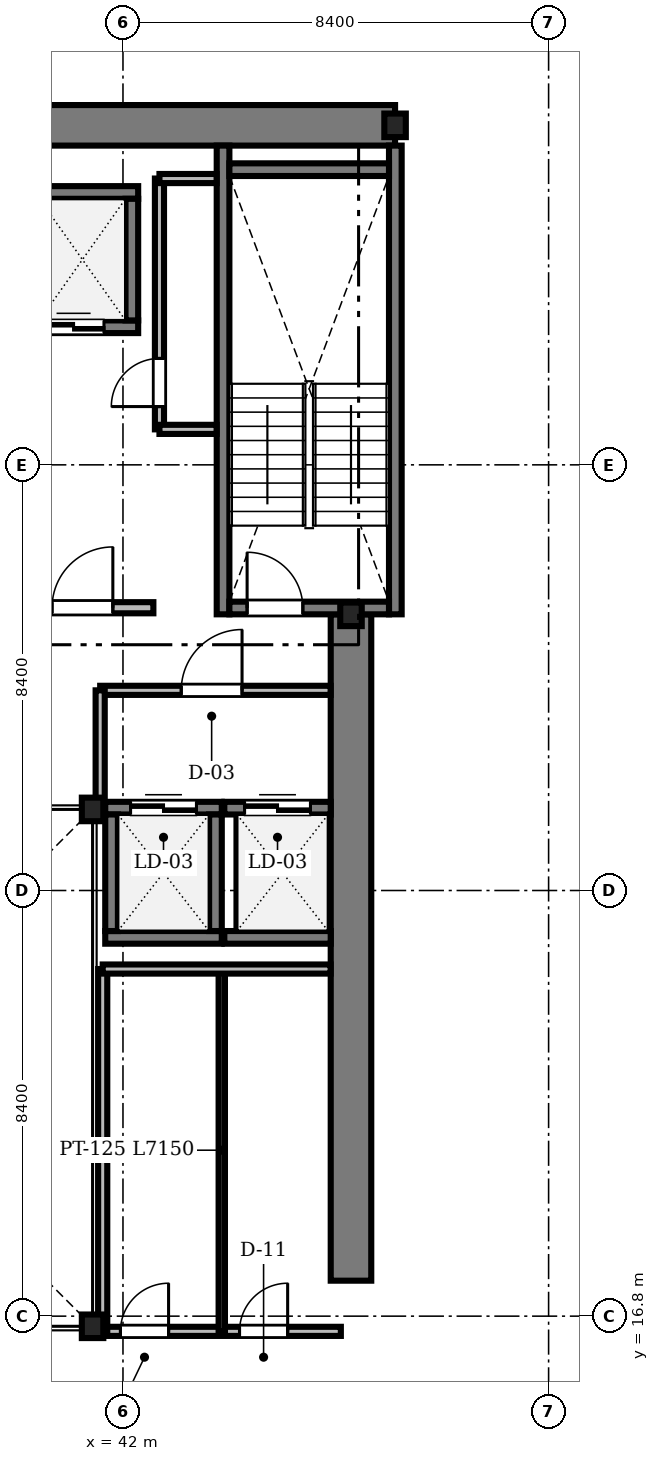
"""IFC4 building model, lengths in metres.
Left out: names, types, materials, properties, quantities, classifications, styles, units other than length and angle.
Written with IfcOpenShell. Run it as: python <this file> out.ifc"""

import sys

from ifc_helpers import new_model, si_unit, direction, frame, frame_2d, origin, origin_2d, place, context, subcontext, project, spatial, rectangle, i_section, extrude, source, transform, mapped, element, fill, save


model = new_model("IFC4")
c1 = context("Model", 3, precision=1e-05, world=origin(), true_north=direction((0.0, 1.0)))
c2 = subcontext(c1, "Body", "Model", "MODEL_VIEW")
j1 = project(units=[si_unit("LENGTHUNIT", "METRE"), si_unit("PLANEANGLEUNIT", "RADIAN")], contexts=[c1])
p1 = place(None, origin())
s1 = spatial("IfcSite", under=j1, at=p1, CompositionType="ELEMENT")
p2 = place(p1, origin())
s2 = spatial("IfcBuilding", under=s1, at=p2, CompositionType="ELEMENT")
p3 = place(p2, frame((0.0, 0.0, 155.7)))
s3 = spatial("IfcBuildingStorey", under=s2, at=p3, CompositionType="ELEMENT", Elevation=155.7)
m1 = source(origin(), c2, "Body", "SweptSolid", [
    extrude(rectangle(XDim=17.52, YDim=0.8, at=frame_2d((8.76, 0.0))), origin(), (0.0, 0.0, 1.0), 3.46),
])
p4 = place(p3, frame((29.85, 40.3, 0.0), z_axis=(0.0, 0.0, 1.0), x_axis=(1.0, 0.0, 0.0)))
e1 = element("IfcWall", 1, at=p4, inside=s3, PredefinedType="SHEAR", context=c2, shape_type="MappedRepresentation", body=[
    mapped(m1, transform((0.0, 0.0, 0.0), scale=1.0)),
])
m2 = source(origin(), c2, "Body", "SweptSolid", [
    extrude(rectangle(XDim=13.15, YDim=0.8, at=frame_2d((6.575, 0.0))), origin(), (0.0, 0.0, 1.0), 3.46),
])
p5 = place(p3, frame((46.5, 17.5, 0.0), z_axis=(0.0, 0.0, 1.0), x_axis=(0.0, 1.0, 0.0)))
e2 = element("IfcWall", 2, at=p5, inside=s3, PredefinedType="SHEAR", context=c2, shape_type="MappedRepresentation", body=[
    mapped(m2, transform((0.0, 0.0, 0.0), scale=1.0)),
])
m3 = source(origin(), c2, "Body", "SweptSolid", [
    extrude(i_section(OverallWidth=0.424, OverallDepth=0.465, WebThickness=0.035, FlangeThickness=0.056, FilletRadius=0.015, at=origin_2d()), origin(), (0.0, 0.0, 1.0), 3.46),
])
for number, where, z_axis, x_axis in (
    (3, (41.4, 16.6, 0.0), (0.0, 0.0, 1.0), (1.0, 0.0, 0.0)),
    (4, (41.4, 26.8, 0.0), (0.0, 0.0, 1.0), (1.0, 0.0, 0.0)),
    (5, (46.5, 30.65, 0.0), (0.0, 0.0, 1.0), (1.0, 0.0, 0.0)),
    (6, (47.37, 40.3, 0.0), (0.0, 0.0, 1.0), (1.0, 0.0, 0.0)),
):
    element("IfcColumn", number, at=place(p3, frame(where, z_axis=z_axis, x_axis=x_axis)), inside=s3, PredefinedType="COLUMN", context=c2, shape_type="MappedRepresentation", body=[
        mapped(m3, transform((0.0, 0.0, 0.0), scale=1.0)),
    ])
m4 = source(origin(), c2, "Body", "SweptSolid", [
    extrude(rectangle(XDim=9.25, YDim=0.25, at=frame_2d((4.625, 0.0))), origin(), (0.0, 0.0, 1.0), 3.5),
])
for number, where, z_axis, x_axis in (
    (7, (43.975, 30.65, 0.0), (0.0, 0.0, 1.0), (0.0, 1.0, 0.0)),
    (8, (47.375, 30.65, 0.0), (0.0, 0.0, 1.0), (0.0, 1.0, 0.0)),
):
    element("IfcWall", number, at=place(p3, frame(where, z_axis=z_axis, x_axis=x_axis)), inside=s3, PredefinedType="SOLIDWALL", context=c2, shape_type="MappedRepresentation", body=[
        mapped(m4, transform((0.0, 0.0, 0.0), scale=1.0)),
    ])
m5 = source(origin(), c2, "Body", "SweptSolid", [
    extrude(rectangle(XDim=3.15, YDim=0.25, at=frame_2d((1.575, 0.0))), origin(), (0.0, 0.0, 1.0), 3.5),
])
p6 = place(p3, frame((44.1, 39.425, 0.0), z_axis=(0.0, 0.0, 1.0), x_axis=(1.0, 0.0, 0.0)))
e9 = element("IfcWall", 9, at=p6, inside=s3, PredefinedType="SOLIDWALL", context=c2, shape_type="MappedRepresentation", body=[
    mapped(m5, transform((0.0, 0.0, 0.0), scale=1.0)),
])
p7 = place(p3, frame((44.1, 30.775, 0.0), z_axis=(0.0, 0.0, 1.0), x_axis=(1.0, 0.0, 0.0)))
e10 = element("IfcWall", 10, at=p7, inside=s3, PredefinedType="SOLIDWALL", context=c2, shape_type="MappedRepresentation", body=[
    mapped(m5, transform((0.0, 0.0, 0.0), scale=1.0)),
])
m6 = source(origin(), c2, "Body", "SweptSolid", [
    extrude(rectangle(XDim=1.1, YDim=2.2, at=frame_2d((0.55, 1.1))), frame((0.0, 0.135, 0.0), z_axis=(0.0, -1.0, 0.0), x_axis=(1.0, 0.0, 0.0)), (0.0, 0.0, 1.0), 0.27),
])
p8 = place(p7, frame((0.35, 0.0, 0.0)))
e11 = element("IfcOpeningElement", 11, at=p8, cuts=e10, PredefinedType="OPENING", context=c2, shape_type="MappedRepresentation", body=[
    mapped(m6, transform((0.0, 0.0, 0.0), scale=1.0)),
])
m7 = source(origin(), c2, "Body", "SweptSolid", [
    extrude(rectangle(XDim=2.8, YDim=0.22, at=frame_2d((1.4, 0.0))), origin(), (0.0, 0.0, 1.0), 3.46),
])
p9 = place(p3, frame((39.8, 30.78, 0.0), z_axis=(0.0, 0.0, 1.0), x_axis=(1.0, 0.0, 0.0)))
e12 = element("IfcWall", 12, at=p9, inside=s3, PredefinedType="SOLIDWALL", context=c2, shape_type="MappedRepresentation", body=[
    mapped(m7, transform((0.0, 0.0, 0.0), scale=1.0)),
])
m8 = source(origin(), c2, "Body", "SweptSolid", [
    extrude(rectangle(XDim=1.2, YDim=2.2, at=frame_2d((0.6, 1.1))), frame((0.0, 0.12, 0.0), z_axis=(0.0, -1.0, 0.0), x_axis=(1.0, 0.0, 0.0)), (0.0, 0.0, 1.0), 0.24),
])
p10 = place(p9, frame((0.8, 0.0, 0.0)))
e13 = element("IfcOpeningElement", 13, at=p10, cuts=e12, PredefinedType="OPENING", context=c2, shape_type="MappedRepresentation", body=[
    mapped(m8, transform((0.0, 0.0, 0.0), scale=1.0)),
])
m9 = source(origin(), c2, "Body", "SweptSolid", [
    extrude(rectangle(XDim=2.55, YDim=0.25, at=frame_2d((1.275, 0.0))), origin(), (0.0, 0.0, 1.0), 3.46),
])
p11 = place(p3, frame((39.75, 36.325, 0.0), z_axis=(0.0, 0.0, 1.0), x_axis=(1.0, 0.0, 0.0)))
e14 = element("IfcWall", 14, at=p11, inside=s3, PredefinedType="SOLIDWALL", context=c2, shape_type="MappedRepresentation", body=[
    mapped(m9, transform((0.0, 0.0, 0.0), scale=1.0)),
])
m10 = source(origin(), c2, "Body", "SweptSolid", [
    extrude(rectangle(XDim=1.2, YDim=2.25, at=frame_2d((0.6, 1.125))), frame((0.0, 0.135, 0.0), z_axis=(0.0, -1.0, 0.0), x_axis=(1.0, 0.0, 0.0)), (0.0, 0.0, 1.0), 0.27),
])
p12 = place(p11, frame((0.675, 0.0, 0.0)))
e15 = element("IfcOpeningElement", 15, at=p12, cuts=e14, PredefinedType="OPENING", context=c2, shape_type="MappedRepresentation", body=[
    mapped(m10, transform((0.0, 0.0, 0.0), scale=1.0)),
])
p13 = place(p3, frame((39.75, 38.975, 0.0), z_axis=(0.0, 0.0, 1.0), x_axis=(1.0, 0.0, 0.0)))
e16 = element("IfcWall", 16, at=p13, inside=s3, PredefinedType="SOLIDWALL", context=c2, shape_type="MappedRepresentation", body=[
    mapped(m9, transform((0.0, 0.0, 0.0), scale=1.0)),
])
m11 = source(origin(), c2, "Body", "SweptSolid", [
    extrude(rectangle(XDim=2.4, YDim=0.25, at=frame_2d((1.2, 0.0))), origin(), (0.0, 0.0, 1.0), 3.46),
])
p14 = place(p3, frame((42.175, 36.45, 0.0), z_axis=(0.0, 0.0, 1.0), x_axis=(0.0, 1.0, 0.0)))
e17 = element("IfcWall", 17, at=p14, inside=s3, PredefinedType="SOLIDWALL", context=c2, shape_type="MappedRepresentation", body=[
    mapped(m11, transform((0.0, 0.0, 0.0), scale=1.0)),
])
m12 = source(origin(), c2, "Body", "SweptSolid", [
    extrude(rectangle(XDim=2.3, YDim=0.25, at=frame_2d((1.15, 0.0))), origin(), (0.0, 0.0, 1.0), 3.46),
])
p15 = place(p3, frame((41.65, 24.275, 0.0), z_axis=(0.0, 0.0, 1.0), x_axis=(1.0, 0.0, 0.0)))
e18 = element("IfcWall", 18, at=p15, inside=s3, PredefinedType="SOLIDWALL", context=c2, shape_type="MappedRepresentation", body=[
    mapped(m12, transform((0.0, 0.0, 0.0), scale=1.0)),
])
p16 = place(p3, frame((41.65, 26.825, 0.0), z_axis=(0.0, 0.0, 1.0), x_axis=(1.0, 0.0, 0.0)))
e19 = element("IfcWall", 19, at=p16, inside=s3, PredefinedType="SOLIDWALL", context=c2, shape_type="MappedRepresentation", body=[
    mapped(m12, transform((0.0, 0.0, 0.0), scale=1.0)),
])
m13 = source(origin(), c2, "Body", "SweptSolid", [
    extrude(rectangle(XDim=1.3, YDim=2.3, at=frame_2d((0.65, 1.15))), frame((0.0, 0.135, 0.0), z_axis=(0.0, -1.0, 0.0), x_axis=(1.0, 0.0, 0.0)), (0.0, 0.0, 1.0), 0.27),
])
p17 = place(p16, frame((0.5, 0.0, 0.0)))
e20 = element("IfcOpeningElement", 20, at=p17, cuts=e19, PredefinedType="OPENING", context=c2, shape_type="MappedRepresentation", body=[
    mapped(m13, transform((0.0, 0.0, 0.0), scale=1.0)),
])
for number, where, z_axis, x_axis in (
    (21, (41.775, 24.4, 0.0), (0.0, 0.0, 1.0), (0.0, 1.0, 0.0)),
    (22, (43.825, 24.4, 0.0), (0.0, 0.0, 1.0), (0.0, 1.0, 0.0)),
):
    element("IfcWall", number, at=place(p3, frame(where, z_axis=z_axis, x_axis=x_axis)), inside=s3, PredefinedType="SOLIDWALL", context=c2, shape_type="MappedRepresentation", body=[
        mapped(m12, transform((0.0, 0.0, 0.0), scale=1.0)),
    ])
m14 = source(origin(), c2, "Body", "SweptSolid", [
    extrude(rectangle(XDim=2.1, YDim=0.25, at=frame_2d((1.05, 0.0))), origin(), (0.0, 0.0, 1.0), 3.46),
])
p18 = place(p3, frame((44.0, 24.275, 0.0), z_axis=(0.0, 0.0, 1.0), x_axis=(1.0, 0.0, 0.0)))
e23 = element("IfcWall", 23, at=p18, inside=s3, PredefinedType="SOLIDWALL", context=c2, shape_type="MappedRepresentation", body=[
    mapped(m14, transform((0.0, 0.0, 0.0), scale=1.0)),
])
p19 = place(p3, frame((44.0, 26.825, 0.0), z_axis=(0.0, 0.0, 1.0), x_axis=(1.0, 0.0, 0.0)))
e24 = element("IfcWall", 24, at=p19, inside=s3, PredefinedType="SOLIDWALL", context=c2, shape_type="MappedRepresentation", body=[
    mapped(m14, transform((0.0, 0.0, 0.0), scale=1.0)),
])
p20 = place(p19, frame((0.4, 0.0, 0.0)))
e25 = element("IfcOpeningElement", 25, at=p20, cuts=e24, PredefinedType="OPENING", context=c2, shape_type="MappedRepresentation", body=[
    mapped(m13, transform((0.0, 0.0, 0.0), scale=1.0)),
])
m15 = source(origin(), c2, "Body", "SweptSolid", [
    extrude(rectangle(XDim=4.95, YDim=0.18, at=frame_2d((2.475, 0.0))), origin(), (0.0, 0.0, 1.0), 3.46),
])
p21 = place(p3, frame((42.72, 34.3, 0.0), z_axis=(0.0, 0.0, 1.0), x_axis=(0.0, 1.0, 0.0)))
e26 = element("IfcWall", 26, at=p21, inside=s3, PredefinedType="PARTITIONING", context=c2, shape_type="MappedRepresentation", body=[
    mapped(m15, transform((0.0, 0.0, 0.0), scale=1.0)),
])
m16 = source(origin(), c2, "Body", "SweptSolid", [
    extrude(rectangle(XDim=0.95, YDim=2.15, at=frame_2d((0.475, 1.075))), frame((0.0, 0.1, 0.0), z_axis=(0.0, -1.0, 0.0), x_axis=(1.0, 0.0, 0.0)), (0.0, 0.0, 1.0), 0.2),
])
p22 = place(p21, frame((0.45, 0.0, 0.0)))
e27 = element("IfcOpeningElement", 27, at=p22, cuts=e26, PredefinedType="OPENING", context=c2, shape_type="MappedRepresentation", body=[
    mapped(m16, transform((0.0, 0.0, 0.0), scale=1.0)),
])
m17 = source(origin(), c2, "Body", "SweptSolid", [
    extrude(rectangle(XDim=4.548, YDim=0.18, at=frame_2d((2.274, 0.0))), origin(), (0.0, 0.0, 1.0), 3.092),
])
p23 = place(p3, frame((41.55, 29.15, 0.0), z_axis=(0.0, 0.0, 1.0), x_axis=(1.0, 0.0, 0.0)))
e28 = element("IfcWall", 28, at=p23, inside=s3, PredefinedType="PARTITIONING", context=c2, shape_type="MappedRepresentation", body=[
    mapped(m17, transform((0.0, 0.0, 0.0), scale=1.0)),
])
m18 = source(origin(), c2, "Body", "SweptSolid", [
    extrude(rectangle(XDim=1.2, YDim=2.2, at=frame_2d((0.6, 1.1))), frame((0.0, 0.1, 0.0), z_axis=(0.0, -1.0, 0.0), x_axis=(1.0, 0.0, 0.0)), (0.0, 0.0, 1.0), 0.2),
])
p24 = place(p23, frame((1.6, 0.0, 0.0)))
e29 = element("IfcOpeningElement", 29, at=p24, cuts=e28, PredefinedType="OPENING", context=c2, shape_type="MappedRepresentation", body=[
    mapped(m18, transform((0.0, 0.0, 0.0), scale=1.0)),
])
m19 = source(origin(), c2, "Body", "SweptSolid", [
    extrude(rectangle(XDim=4.7, YDim=0.18, at=frame_2d((2.35, 0.0))), origin(), (0.0, 0.0, 1.0), 2.852),
])
p25 = place(p3, frame((41.6, 16.5, 0.0), z_axis=(0.0, 0.0, 1.0), x_axis=(1.0, 0.0, 0.0)))
e30 = element("IfcWall", 30, at=p25, inside=s3, PredefinedType="PARTITIONING", context=c2, shape_type="MappedRepresentation", body=[
    mapped(m19, transform((0.0, 0.0, 0.0), scale=1.0)),
])
p26 = place(p25, frame((0.35, 0.0, 0.0)))
e31 = element("IfcOpeningElement", 31, at=p26, cuts=e30, PredefinedType="OPENING", context=c2, shape_type="MappedRepresentation", body=[
    mapped(m16, transform((0.0, 0.0, 0.0), scale=1.0)),
])
p27 = place(p25, frame((2.7, 0.0, 0.0)))
e32 = element("IfcOpeningElement", 32, at=p27, cuts=e30, PredefinedType="OPENING", context=c2, shape_type="MappedRepresentation", body=[
    mapped(m16, transform((0.0, 0.0, 0.0), scale=1.0)),
])
m20 = source(origin(), c2, "Body", "SweptSolid", [
    extrude(rectangle(XDim=7.15, YDim=0.18, at=frame_2d((3.575, 0.0))), origin(), (0.0, 0.0, 1.0), 2.852),
])
p28 = place(p3, frame((41.6, 16.5, 0.0), z_axis=(0.0, 0.0, 1.0), x_axis=(0.0, 1.0, 0.0)))
e33 = element("IfcWall", 33, at=p28, inside=s3, PredefinedType="PARTITIONING", context=c2, shape_type="MappedRepresentation", body=[
    mapped(m20, transform((0.0, 0.0, 0.0), scale=1.0)),
])
m21 = source(origin(), c2, "Body", "SweptSolid", [
    extrude(rectangle(XDim=7.15, YDim=0.125, at=frame_2d((3.575, 0.0))), origin(), (0.0, 0.0, 1.0), 2.852),
])
p29 = place(p3, frame((43.95, 16.5, 0.0), z_axis=(0.0, 0.0, 1.0), x_axis=(0.0, 1.0, 0.0)))
e34 = element("IfcWall", 34, at=p29, inside=s3, PredefinedType="PARTITIONING", context=c2, shape_type="MappedRepresentation", body=[
    mapped(m21, transform((0.0, 0.0, 0.0), scale=1.0)),
])
m22 = source(origin(), c2, "Body", "SweptSolid", [
    extrude(rectangle(XDim=4.498, YDim=0.18, at=frame_2d((2.249, 0.0))), origin(), (0.0, 0.0, 1.0), 3.46),
])
p30 = place(p3, frame((41.6, 23.65, 0.0), z_axis=(0.0, 0.0, 1.0), x_axis=(1.0, 0.0, 0.0)))
e35 = element("IfcWall", 35, at=p30, inside=s3, PredefinedType="PARTITIONING", context=c2, shape_type="MappedRepresentation", body=[
    mapped(m22, transform((0.0, 0.0, 0.0), scale=1.0)),
])
m23 = source(origin(), c2, "Body", "SweptSolid", [
    extrude(rectangle(XDim=2.35, YDim=0.18, at=frame_2d((1.175, 0.0))), origin(), (0.0, 0.0, 1.0), 2.852),
])
p31 = place(p3, frame((41.55, 26.8, 0.0), z_axis=(0.0, 0.0, 1.0), x_axis=(0.0, 1.0, 0.0)))
e36 = element("IfcWall", 36, at=p31, inside=s3, PredefinedType="PARTITIONING", context=c2, shape_type="MappedRepresentation", body=[
    mapped(m23, transform((0.0, 0.0, 0.0), scale=1.0)),
])
m24 = source(origin(), c2, "Body", "SweptSolid", [
    extrude(rectangle(XDim=1.128, YDim=0.18, at=frame_2d((0.564, 0.0))), origin(), (0.0, 0.0, 1.0), 3.46),
])
for number, where, z_axis, x_axis in (
    (37, (42.72, 34.3, 0.0), (0.0, 0.0, 1.0), (1.0, 0.0, 0.0)),
    (38, (42.72, 39.25, 0.0), (0.0, 0.0, 1.0), (1.0, 0.0, 0.0)),
):
    element("IfcWall", number, at=place(p3, frame(where, z_axis=z_axis, x_axis=x_axis)), inside=s3, PredefinedType="PARTITIONING", context=c2, shape_type="MappedRepresentation", body=[
        mapped(m24, transform((0.0, 0.0, 0.0), scale=1.0)),
    ])
m25 = source(origin(), c2, "Body", "SweptSolid", [
    extrude(rectangle(XDim=1.1, YDim=2.2, at=frame_2d((0.55, 1.1))), frame((0.0, 0.025, 0.0), z_axis=(0.0, -1.0, 0.0), x_axis=(1.0, 0.0, 0.0)), (0.0, 0.0, 1.0), 0.05),
])
p32 = place(p8, origin())
e39 = element("IfcDoor", 39, at=p32, inside=s3, OperationType="SINGLE_SWING_LEFT", PredefinedType="DOOR", context=c2, shape_type="MappedRepresentation", body=[
    mapped(m25, transform((0.0, 0.0, 0.0), scale=1.0)),
])
fill(e11, e39)
m26 = source(origin(), c2, "Body", "SweptSolid", [
    extrude(rectangle(XDim=1.2, YDim=2.2, at=frame_2d((0.6, 1.1))), frame((0.0, 0.025, 0.0), z_axis=(0.0, -1.0, 0.0), x_axis=(1.0, 0.0, 0.0)), (0.0, 0.0, 1.0), 0.05),
])
p33 = place(p10, origin())
e40 = element("IfcDoor", 40, at=p33, inside=s3, OperationType="SINGLE_SWING_RIGHT", PredefinedType="DOOR", context=c2, shape_type="MappedRepresentation", body=[
    mapped(m26, transform((0.0, 0.0, 0.0), scale=1.0)),
])
fill(e13, e40)
m27 = source(origin(), c2, "Body", "SweptSolid", [
    extrude(rectangle(XDim=1.2, YDim=2.25, at=frame_2d((0.6, 1.125))), frame((0.0, 0.025, 0.0), z_axis=(0.0, -1.0, 0.0), x_axis=(1.0, 0.0, 0.0)), (0.0, 0.0, 1.0), 0.05),
])
p34 = place(p12, origin())
e41 = element("IfcDoor", 41, at=p34, inside=s3, OperationType="DOUBLE_DOOR_SLIDING", PredefinedType="DOOR", context=c2, shape_type="MappedRepresentation", body=[
    mapped(m27, transform((0.0, 0.0, 0.0), scale=1.0)),
])
fill(e15, e41)
m28 = source(origin(), c2, "Body", "SweptSolid", [
    extrude(rectangle(XDim=1.3, YDim=2.3, at=frame_2d((0.65, 1.15))), frame((0.0, 0.025, 0.0), z_axis=(0.0, -1.0, 0.0), x_axis=(1.0, 0.0, 0.0)), (0.0, 0.0, 1.0), 0.05),
])
p35 = place(p17, origin())
e42 = element("IfcDoor", 42, at=p35, inside=s3, OperationType="DOUBLE_DOOR_SLIDING", PredefinedType="DOOR", context=c2, shape_type="MappedRepresentation", body=[
    mapped(m28, transform((0.0, 0.0, 0.0), scale=1.0)),
])
fill(e20, e42)
p36 = place(p20, origin())
e43 = element("IfcDoor", 43, at=p36, inside=s3, OperationType="DOUBLE_DOOR_SLIDING", PredefinedType="DOOR", context=c2, shape_type="MappedRepresentation", body=[
    mapped(m28, transform((0.0, 0.0, 0.0), scale=1.0)),
])
fill(e25, e43)
m29 = source(origin(), c2, "Body", "SweptSolid", [
    extrude(rectangle(XDim=0.95, YDim=2.15, at=frame_2d((0.475, 1.075))), frame((0.0, 0.025, 0.0), z_axis=(0.0, -1.0, 0.0), x_axis=(1.0, 0.0, 0.0)), (0.0, 0.0, 1.0), 0.05),
])
p37 = place(p22, origin())
e44 = element("IfcDoor", 44, at=p37, inside=s3, OperationType="SINGLE_SWING_LEFT", PredefinedType="DOOR", context=c2, shape_type="MappedRepresentation", body=[
    mapped(m29, transform((0.0, 0.0, 0.0), scale=1.0)),
])
fill(e27, e44)
p38 = place(p24, origin())
e45 = element("IfcDoor", 45, at=p38, inside=s3, OperationType="SINGLE_SWING_RIGHT", PredefinedType="DOOR", context=c2, shape_type="MappedRepresentation", body=[
    mapped(m26, transform((0.0, 0.0, 0.0), scale=1.0)),
])
fill(e29, e45)
p39 = place(p26, origin())
e46 = element("IfcDoor", 46, at=p39, inside=s3, OperationType="SINGLE_SWING_RIGHT", PredefinedType="DOOR", context=c2, shape_type="MappedRepresentation", body=[
    mapped(m29, transform((0.0, 0.0, 0.0), scale=1.0)),
])
fill(e31, e46)
p40 = place(p27, origin())
e47 = element("IfcDoor", 47, at=p40, inside=s3, OperationType="SINGLE_SWING_RIGHT", PredefinedType="DOOR", context=c2, shape_type="MappedRepresentation", body=[
    mapped(m29, transform((0.0, 0.0, 0.0), scale=1.0)),
])
fill(e32, e47)
save(model, sys.argv[1])
